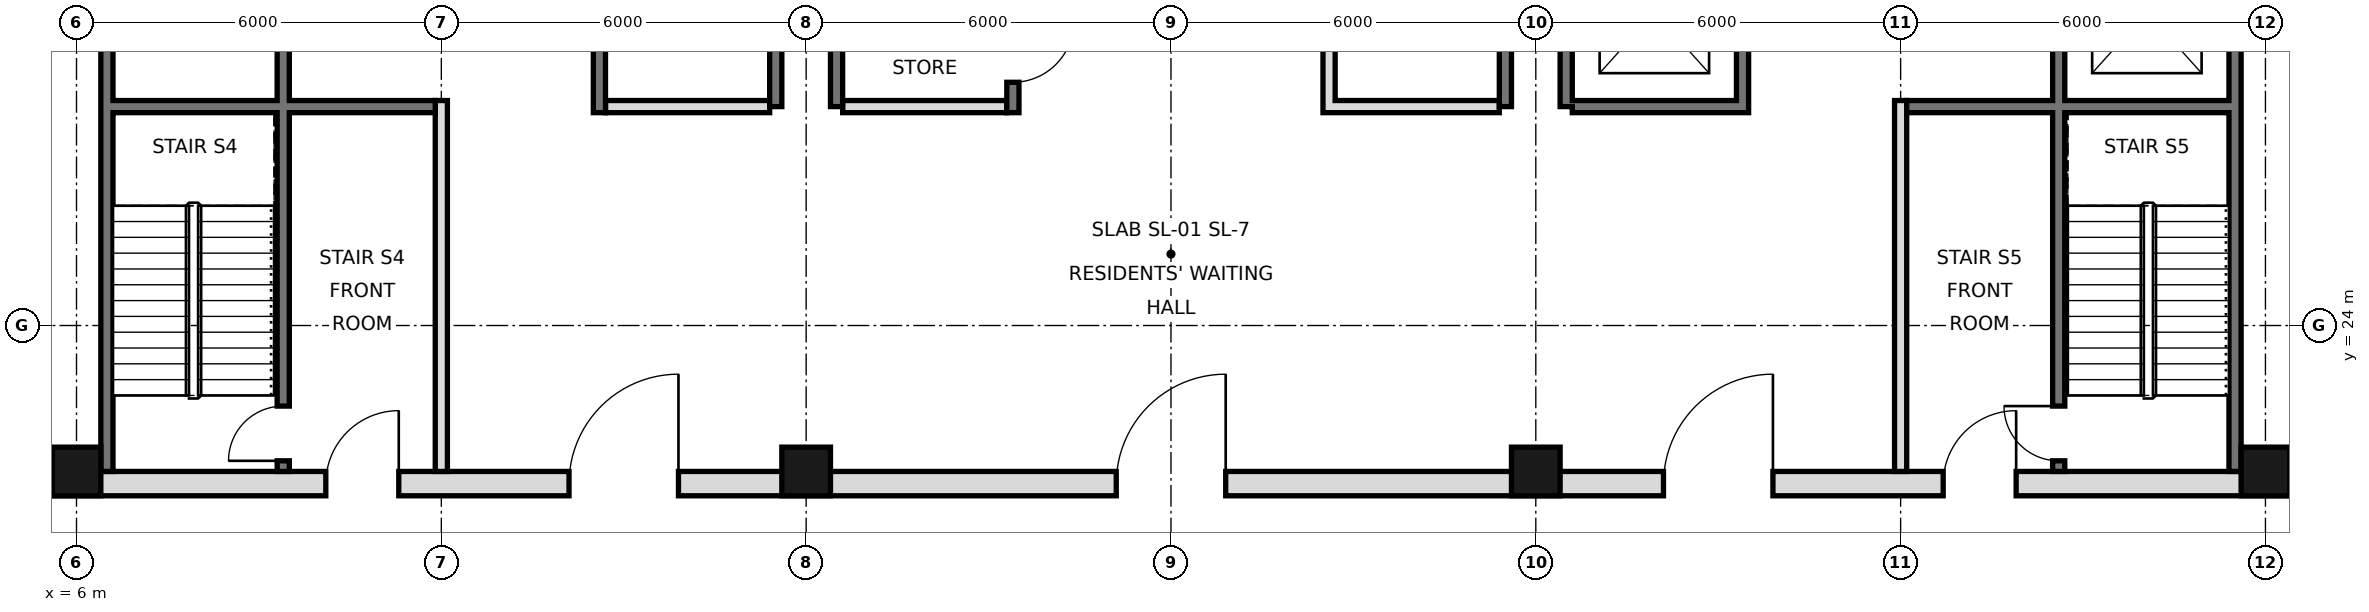
"""IFC4 building model, lengths in metres.
Left out: names, types, materials, properties, quantities, classifications, styles, units other than length and angle.
Written with IfcOpenShell. Run it as: python <this file> out.ifc"""

import sys

from ifc_helpers import new_model, si_unit, direction, frame, frame_2d, origin, origin_2d, place, context, subcontext, project, spatial, rectangle, hollow_rectangle, extrude, element, fill, save


model = new_model("IFC4")
c1 = context("Model", 3, precision=1e-05, world=origin(), true_north=direction((0.0, 1.0)))
c2 = subcontext(c1, "Body", "Model", "MODEL_VIEW")
j1 = project(units=[si_unit("LENGTHUNIT", "METRE"), si_unit("PLANEANGLEUNIT", "RADIAN")], contexts=[c1])
p1 = place(None, origin())
s1 = spatial("IfcSite", under=j1, at=p1, CompositionType="ELEMENT")
p2 = place(p1, origin())
s2 = spatial("IfcBuilding", under=s1, at=p2, CompositionType="ELEMENT")
p3 = place(p2, frame((0.0, 0.0, 326.8)))
s3 = spatial("IfcBuildingStorey", under=s2, at=p3, CompositionType="ELEMENT", Elevation=326.8)
for number, where, z_axis, x_axis in (
    (1, (6.0, 21.6, 0.0), (0.0, 0.0, 1.0), (1.0, 0.0, 0.0)),
    (2, (18.0, 21.6, 0.0), (0.0, 0.0, 1.0), (1.0, 0.0, 0.0)),
    (3, (30.0, 21.6, 0.0), (0.0, 0.0, 1.0), (1.0, 0.0, 0.0)),
    (4, (42.0, 21.6, 0.0), (0.0, 0.0, 1.0), (1.0, 0.0, 0.0)),
):
    element("IfcColumn", number, at=place(p3, frame(where, z_axis=z_axis, x_axis=x_axis)), inside=s3, PredefinedType="COLUMN", context=c2, shape_type="SweptSolid", body=[
        extrude(hollow_rectangle(XDim=0.8, YDim=0.8, WallThickness=0.025, at=origin_2d()), origin(), (0.0, 0.0, 1.0), 4.4),
    ])
for number, where, z_axis, x_axis in (
    (5, (6.5, 21.6, 0.0), (0.0, 0.0, 1.0), (0.0, 1.0, 0.0)),
    (6, (41.5, 21.6, 0.0), (0.0, 0.0, 1.0), (0.0, 1.0, 0.0)),
):
    element("IfcWall", number, at=place(p3, frame(where, z_axis=z_axis, x_axis=x_axis)), inside=s3, PredefinedType="SOLIDWALL", context=c2, shape_type="SweptSolid", body=[
        extrude(rectangle(XDim=23.5, YDim=0.2, at=frame_2d((11.75, 0.0))), origin(), (0.0, 0.0, 1.0), 4.1),
    ])
for number, where, z_axis, x_axis in (
    (7, (17.5, 27.6, 0.0), (0.0, 0.0, 1.0), (0.0, 1.0, 0.0)),
    (8, (18.5, 27.6, 0.0), (0.0, 0.0, 1.0), (0.0, 1.0, 0.0)),
    (9, (29.5, 27.6, 0.0), (0.0, 0.0, 1.0), (0.0, 1.0, 0.0)),
    (10, (30.5, 27.6, 0.0), (0.0, 0.0, 1.0), (0.0, 1.0, 0.0)),
):
    element("IfcWall", number, at=place(p3, frame(where, z_axis=z_axis, x_axis=x_axis)), inside=s3, PredefinedType="SOLIDWALL", context=c2, shape_type="SweptSolid", body=[
        extrude(rectangle(XDim=17.5, YDim=0.2, at=frame_2d((8.75, 0.0))), origin(), (0.0, 0.0, 1.0), 4.1),
    ])
p4 = place(p3, frame((5.6, 21.4, 0.0), z_axis=(0.0, 0.0, 1.0), x_axis=(1.0, 0.0, 0.0)))
e11 = element("IfcWall", 11, at=p4, inside=s3, PredefinedType="SOLIDWALL", context=c2, shape_type="SweptSolid", body=[
    extrude(rectangle(XDim=36.8, YDim=0.4, at=frame_2d((18.4, 0.0))), origin(), (0.0, 0.0, 1.0), 4.1),
])
p5 = place(p4, frame((8.5, 0.0, 0.0)))
e12 = element("IfcOpeningElement", 12, at=p5, cuts=e11, PredefinedType="OPENING", context=c2, shape_type="SweptSolid", body=[
    extrude(rectangle(XDim=1.8, YDim=2.1, at=frame_2d((0.9, 1.05))), frame((0.0, 0.21, 0.0), z_axis=(0.0, -1.0, 0.0), x_axis=(1.0, 0.0, 0.0)), (0.0, 0.0, 1.0), 0.42),
])
p6 = place(p4, frame((17.5, 0.0, 0.0)))
e13 = element("IfcOpeningElement", 13, at=p6, cuts=e11, PredefinedType="OPENING", context=c2, shape_type="SweptSolid", body=[
    extrude(rectangle(XDim=1.8, YDim=2.1, at=frame_2d((0.9, 1.05))), frame((0.0, 0.21, 0.0), z_axis=(0.0, -1.0, 0.0), x_axis=(1.0, 0.0, 0.0)), (0.0, 0.0, 1.0), 0.42),
])
p7 = place(p4, frame((26.5, 0.0, 0.0)))
e14 = element("IfcOpeningElement", 14, at=p7, cuts=e11, PredefinedType="OPENING", context=c2, shape_type="SweptSolid", body=[
    extrude(rectangle(XDim=1.8, YDim=2.1, at=frame_2d((0.9, 1.05))), frame((0.0, 0.21, 0.0), z_axis=(0.0, -1.0, 0.0), x_axis=(1.0, 0.0, 0.0)), (0.0, 0.0, 1.0), 0.42),
])
p8 = place(p4, frame((4.5, 0.0, 0.0)))
e15 = element("IfcOpeningElement", 15, at=p8, cuts=e11, PredefinedType="OPENING", context=c2, shape_type="SweptSolid", body=[
    extrude(rectangle(XDim=1.2, YDim=2.1, at=frame_2d((0.6, 1.05))), frame((0.0, 0.21, 0.0), z_axis=(0.0, -1.0, 0.0), x_axis=(1.0, 0.0, 0.0)), (0.0, 0.0, 1.0), 0.42),
])
p9 = place(p4, frame((31.1, 0.0, 0.0)))
e16 = element("IfcOpeningElement", 16, at=p9, cuts=e11, PredefinedType="OPENING", context=c2, shape_type="SweptSolid", body=[
    extrude(rectangle(XDim=1.2, YDim=2.1, at=frame_2d((0.6, 1.05))), frame((0.0, 0.21, 0.0), z_axis=(0.0, -1.0, 0.0), x_axis=(1.0, 0.0, 0.0)), (0.0, 0.0, 1.0), 0.42),
])
p10 = place(p3, frame((12.0, 21.6, 0.0), z_axis=(0.0, 0.0, 1.0), x_axis=(0.0, 1.0, 0.0)))
e17 = element("IfcWall", 17, at=p10, inside=s3, PredefinedType="PARTITIONING", context=c2, shape_type="SweptSolid", body=[
    extrude(rectangle(XDim=6.1, YDim=0.2, at=frame_2d((3.05, 0.0))), origin(), (0.0, 0.0, 1.0), 4.1),
])
p11 = place(p3, frame((14.6, 27.5, 0.0), z_axis=(0.0, 0.0, 1.0), x_axis=(0.0, 1.0, 0.0)))
e18 = element("IfcWall", 18, at=p11, inside=s3, PredefinedType="SOLIDWALL", context=c2, shape_type="SweptSolid", body=[
    extrude(rectangle(XDim=17.5, YDim=0.2, at=frame_2d((8.75, 0.0))), origin(), (0.0, 0.0, 1.0), 4.1),
])
p12 = place(p11, frame((15.4, 0.0, 0.0)))
e19 = element("IfcOpeningElement", 19, at=p12, cuts=e18, PredefinedType="OPENING", context=c2, shape_type="SweptSolid", body=[
    extrude(rectangle(XDim=1.1, YDim=2.1, at=frame_2d((0.55, 1.05))), frame((0.0, 0.11, 0.0), z_axis=(0.0, -1.0, 0.0), x_axis=(1.0, 0.0, 0.0)), (0.0, 0.0, 1.0), 0.22),
])
p13 = place(p11, frame((2.7, 0.0, 0.0)))
e20 = element("IfcOpeningElement", 20, at=p13, cuts=e18, PredefinedType="OPENING", context=c2, shape_type="SweptSolid", body=[
    extrude(rectangle(XDim=1.0, YDim=2.1, at=frame_2d((0.5, 1.05))), frame((0.0, 0.11, 0.0), z_axis=(0.0, -1.0, 0.0), x_axis=(1.0, 0.0, 0.0)), (0.0, 0.0, 1.0), 0.22),
])
p14 = place(p11, frame((9.9, 0.0, 0.0)))
e21 = element("IfcOpeningElement", 21, at=p14, cuts=e18, PredefinedType="OPENING", context=c2, shape_type="SweptSolid", body=[
    extrude(rectangle(XDim=0.9, YDim=2.1, at=frame_2d((0.45, 1.05))), frame((0.0, 0.11, 0.0), z_axis=(0.0, -1.0, 0.0), x_axis=(1.0, 0.0, 0.0)), (0.0, 0.0, 1.0), 0.22),
])
p15 = place(p3, frame((21.4, 27.5, 0.0), z_axis=(0.0, 0.0, 1.0), x_axis=(0.0, 1.0, 0.0)))
e22 = element("IfcWall", 22, at=p15, inside=s3, PredefinedType="SOLIDWALL", context=c2, shape_type="SweptSolid", body=[
    extrude(rectangle(XDim=17.5, YDim=0.2, at=frame_2d((8.75, 0.0))), origin(), (0.0, 0.0, 1.0), 4.1),
])
p16 = place(p15, frame((0.5, 0.0, 0.0)))
e23 = element("IfcOpeningElement", 23, at=p16, cuts=e22, PredefinedType="OPENING", context=c2, shape_type="SweptSolid", body=[
    extrude(rectangle(XDim=1.0, YDim=2.1, at=frame_2d((0.5, 1.05))), frame((0.0, 0.11, 0.0), z_axis=(0.0, -1.0, 0.0), x_axis=(1.0, 0.0, 0.0)), (0.0, 0.0, 1.0), 0.22),
])
p17 = place(p15, frame((3.6, 0.0, 0.0)))
e24 = element("IfcOpeningElement", 24, at=p17, cuts=e22, PredefinedType="OPENING", context=c2, shape_type="SweptSolid", body=[
    extrude(rectangle(XDim=1.0, YDim=2.1, at=frame_2d((0.5, 1.05))), frame((0.0, 0.11, 0.0), z_axis=(0.0, -1.0, 0.0), x_axis=(1.0, 0.0, 0.0)), (0.0, 0.0, 1.0), 0.22),
])
p18 = place(p15, frame((16.2, 0.0, 0.0)))
e25 = element("IfcOpeningElement", 25, at=p18, cuts=e22, PredefinedType="OPENING", context=c2, shape_type="SweptSolid", body=[
    extrude(rectangle(XDim=1.0, YDim=2.1, at=frame_2d((0.5, 1.05))), frame((0.0, 0.11, 0.0), z_axis=(0.0, -1.0, 0.0), x_axis=(1.0, 0.0, 0.0)), (0.0, 0.0, 1.0), 0.22),
])
p19 = place(p15, frame((7.4, 0.0, 0.0)))
e26 = element("IfcOpeningElement", 26, at=p19, cuts=e22, PredefinedType="OPENING", context=c2, shape_type="SweptSolid", body=[
    extrude(rectangle(XDim=0.9, YDim=2.1, at=frame_2d((0.45, 1.05))), frame((0.0, 0.11, 0.0), z_axis=(0.0, -1.0, 0.0), x_axis=(1.0, 0.0, 0.0)), (0.0, 0.0, 1.0), 0.22),
])
p20 = place(p3, frame((26.6, 27.5, 0.0), z_axis=(0.0, 0.0, 1.0), x_axis=(0.0, 1.0, 0.0)))
e27 = element("IfcWall", 27, at=p20, inside=s3, PredefinedType="SOLIDWALL", context=c2, shape_type="SweptSolid", body=[
    extrude(rectangle(XDim=17.5, YDim=0.2, at=frame_2d((8.75, 0.0))), origin(), (0.0, 0.0, 1.0), 4.1),
])
p21 = place(p20, frame((4.3, 0.0, 0.0)))
e28 = element("IfcOpeningElement", 28, at=p21, cuts=e27, PredefinedType="OPENING", context=c2, shape_type="SweptSolid", body=[
    extrude(rectangle(XDim=0.9, YDim=2.1, at=frame_2d((0.45, 1.05))), frame((0.0, 0.11, 0.0), z_axis=(0.0, -1.0, 0.0), x_axis=(1.0, 0.0, 0.0)), (0.0, 0.0, 1.0), 0.22),
])
p22 = place(p20, frame((10.35, 0.0, 0.0)))
e29 = element("IfcOpeningElement", 29, at=p22, cuts=e27, PredefinedType="OPENING", context=c2, shape_type="SweptSolid", body=[
    extrude(rectangle(XDim=1.0, YDim=2.1, at=frame_2d((0.5, 1.05))), frame((0.0, 0.11, 0.0), z_axis=(0.0, -1.0, 0.0), x_axis=(1.0, 0.0, 0.0)), (0.0, 0.0, 1.0), 0.22),
])
p23 = place(p20, frame((14.575, 0.0, 0.0)))
e30 = element("IfcOpeningElement", 30, at=p23, cuts=e27, PredefinedType="OPENING", context=c2, shape_type="SweptSolid", body=[
    extrude(rectangle(XDim=1.0, YDim=2.1, at=frame_2d((0.5, 1.05))), frame((0.0, 0.11, 0.0), z_axis=(0.0, -1.0, 0.0), x_axis=(1.0, 0.0, 0.0)), (0.0, 0.0, 1.0), 0.22),
])
p24 = place(p3, frame((33.4, 27.5, 0.0), z_axis=(0.0, 0.0, 1.0), x_axis=(0.0, 1.0, 0.0)))
e31 = element("IfcWall", 31, at=p24, inside=s3, PredefinedType="SOLIDWALL", context=c2, shape_type="SweptSolid", body=[
    extrude(rectangle(XDim=17.5, YDim=0.2, at=frame_2d((8.75, 0.0))), origin(), (0.0, 0.0, 1.0), 4.1),
])
p25 = place(p24, frame((1.1, 0.0, 0.0)))
e32 = element("IfcOpeningElement", 32, at=p25, cuts=e31, PredefinedType="OPENING", context=c2, shape_type="SweptSolid", body=[
    extrude(rectangle(XDim=1.1, YDim=2.1, at=frame_2d((0.55, 1.05))), frame((0.0, 0.11, 0.0), z_axis=(0.0, -1.0, 0.0), x_axis=(1.0, 0.0, 0.0)), (0.0, 0.0, 1.0), 0.22),
])
p26 = place(p24, frame((4.2, 0.0, 0.0)))
e33 = element("IfcOpeningElement", 33, at=p26, cuts=e31, PredefinedType="OPENING", context=c2, shape_type="SweptSolid", body=[
    extrude(rectangle(XDim=1.1, YDim=2.1, at=frame_2d((0.55, 1.05))), frame((0.0, 0.11, 0.0), z_axis=(0.0, -1.0, 0.0), x_axis=(1.0, 0.0, 0.0)), (0.0, 0.0, 1.0), 0.22),
])
p27 = place(p24, frame((15.4, 0.0, 0.0)))
e34 = element("IfcOpeningElement", 34, at=p27, cuts=e31, PredefinedType="OPENING", context=c2, shape_type="SweptSolid", body=[
    extrude(rectangle(XDim=1.1, YDim=2.1, at=frame_2d((0.55, 1.05))), frame((0.0, 0.11, 0.0), z_axis=(0.0, -1.0, 0.0), x_axis=(1.0, 0.0, 0.0)), (0.0, 0.0, 1.0), 0.22),
])
p28 = place(p24, frame((9.9, 0.0, 0.0)))
e35 = element("IfcOpeningElement", 35, at=p28, cuts=e31, PredefinedType="OPENING", context=c2, shape_type="SweptSolid", body=[
    extrude(rectangle(XDim=0.9, YDim=2.1, at=frame_2d((0.45, 1.05))), frame((0.0, 0.11, 0.0), z_axis=(0.0, -1.0, 0.0), x_axis=(1.0, 0.0, 0.0)), (0.0, 0.0, 1.0), 0.22),
])
p29 = place(p3, frame((36.0, 21.6, 0.0), z_axis=(0.0, 0.0, 1.0), x_axis=(0.0, 1.0, 0.0)))
e36 = element("IfcWall", 36, at=p29, inside=s3, PredefinedType="PARTITIONING", context=c2, shape_type="SweptSolid", body=[
    extrude(rectangle(XDim=6.1, YDim=0.2, at=frame_2d((3.05, 0.0))), origin(), (0.0, 0.0, 1.0), 4.1),
])
p30 = place(p3, frame((38.6, 21.6, 0.0), z_axis=(0.0, 0.0, 1.0), x_axis=(0.0, 1.0, 0.0)))
e37 = element("IfcWall", 37, at=p30, inside=s3, PredefinedType="SOLIDWALL", context=c2, shape_type="SweptSolid", body=[
    extrude(rectangle(XDim=23.4, YDim=0.2, at=frame_2d((11.7, 0.0))), origin(), (0.0, 0.0, 1.0), 4.1),
])
p31 = place(p30, frame((7.0, 0.0, 0.0)))
e38 = element("IfcOpeningElement", 38, at=p31, cuts=e37, PredefinedType="OPENING", context=c2, shape_type="SweptSolid", body=[
    extrude(rectangle(XDim=1.1, YDim=2.1, at=frame_2d((0.55, 1.05))), frame((0.0, 0.11, 0.0), z_axis=(0.0, -1.0, 0.0), x_axis=(1.0, 0.0, 0.0)), (0.0, 0.0, 1.0), 0.22),
])
p32 = place(p30, frame((10.1, 0.0, 0.0)))
e39 = element("IfcOpeningElement", 39, at=p32, cuts=e37, PredefinedType="OPENING", context=c2, shape_type="SweptSolid", body=[
    extrude(rectangle(XDim=1.1, YDim=2.1, at=frame_2d((0.55, 1.05))), frame((0.0, 0.11, 0.0), z_axis=(0.0, -1.0, 0.0), x_axis=(1.0, 0.0, 0.0)), (0.0, 0.0, 1.0), 0.22),
])
p33 = place(p30, frame((13.2, 0.0, 0.0)))
e40 = element("IfcOpeningElement", 40, at=p33, cuts=e37, PredefinedType="OPENING", context=c2, shape_type="SweptSolid", body=[
    extrude(rectangle(XDim=1.1, YDim=2.1, at=frame_2d((0.55, 1.05))), frame((0.0, 0.11, 0.0), z_axis=(0.0, -1.0, 0.0), x_axis=(1.0, 0.0, 0.0)), (0.0, 0.0, 1.0), 0.22),
])
p34 = place(p30, frame((22.1, 0.0, 0.0)))
e41 = element("IfcOpeningElement", 41, at=p34, cuts=e37, PredefinedType="OPENING", context=c2, shape_type="SweptSolid", body=[
    extrude(rectangle(XDim=1.0, YDim=2.1, at=frame_2d((0.5, 1.05))), frame((0.0, 0.11, 0.0), z_axis=(0.0, -1.0, 0.0), x_axis=(1.0, 0.0, 0.0)), (0.0, 0.0, 1.0), 0.22),
])
p35 = place(p30, frame((0.175, 0.0, 0.0)))
e42 = element("IfcOpeningElement", 42, at=p35, cuts=e37, PredefinedType="OPENING", context=c2, shape_type="SweptSolid", body=[
    extrude(rectangle(XDim=0.9, YDim=2.1, at=frame_2d((0.45, 1.05))), frame((0.0, 0.11, 0.0), z_axis=(0.0, -1.0, 0.0), x_axis=(1.0, 0.0, 0.0)), (0.0, 0.0, 1.0), 0.22),
])
p36 = place(p3, frame((9.4, 21.6, 0.0), z_axis=(0.0, 0.0, 1.0), x_axis=(0.0, 1.0, 0.0)))
e43 = element("IfcWall", 43, at=p36, inside=s3, PredefinedType="SOLIDWALL", context=c2, shape_type="SweptSolid", body=[
    extrude(rectangle(XDim=23.4, YDim=0.2, at=frame_2d((11.7, 0.0))), origin(), (0.0, 0.0, 1.0), 4.1),
])
p37 = place(p36, frame((7.7, 0.0, 0.0)))
e44 = element("IfcOpeningElement", 44, at=p37, cuts=e43, PredefinedType="OPENING", context=c2, shape_type="SweptSolid", body=[
    extrude(rectangle(XDim=1.0, YDim=2.1, at=frame_2d((0.5, 1.05))), frame((0.0, 0.11, 0.0), z_axis=(0.0, -1.0, 0.0), x_axis=(1.0, 0.0, 0.0)), (0.0, 0.0, 1.0), 0.22),
])
p38 = place(p36, frame((12.35, 0.0, 0.0)))
e45 = element("IfcOpeningElement", 45, at=p38, cuts=e43, PredefinedType="OPENING", context=c2, shape_type="SweptSolid", body=[
    extrude(rectangle(XDim=1.0, YDim=2.1, at=frame_2d((0.5, 1.05))), frame((0.0, 0.11, 0.0), z_axis=(0.0, -1.0, 0.0), x_axis=(1.0, 0.0, 0.0)), (0.0, 0.0, 1.0), 0.22),
])
p39 = place(p36, frame((22.1, 0.0, 0.0)))
e46 = element("IfcOpeningElement", 46, at=p39, cuts=e43, PredefinedType="OPENING", context=c2, shape_type="SweptSolid", body=[
    extrude(rectangle(XDim=1.0, YDim=2.1, at=frame_2d((0.5, 1.05))), frame((0.0, 0.11, 0.0), z_axis=(0.0, -1.0, 0.0), x_axis=(1.0, 0.0, 0.0)), (0.0, 0.0, 1.0), 0.22),
])
p40 = place(p36, frame((0.175, 0.0, 0.0)))
e47 = element("IfcOpeningElement", 47, at=p40, cuts=e43, PredefinedType="OPENING", context=c2, shape_type="SweptSolid", body=[
    extrude(rectangle(XDim=0.9, YDim=2.1, at=frame_2d((0.45, 1.05))), frame((0.0, 0.11, 0.0), z_axis=(0.0, -1.0, 0.0), x_axis=(1.0, 0.0, 0.0)), (0.0, 0.0, 1.0), 0.22),
])
for number, where, z_axis, x_axis in (
    (48, (14.7, 27.6, 0.0), (0.0, 0.0, 1.0), (1.0, 0.0, 0.0)),
    (49, (18.6, 27.6, 0.0), (0.0, 0.0, 1.0), (1.0, 0.0, 0.0)),
):
    element("IfcWall", number, at=place(p3, frame(where, z_axis=z_axis, x_axis=x_axis)), inside=s3, PredefinedType="PARTITIONING", context=c2, shape_type="SweptSolid", body=[
        extrude(rectangle(XDim=2.7, YDim=0.2, at=frame_2d((1.35, 0.0))), origin(), (0.0, 0.0, 1.0), 4.1),
    ])
for number, where, z_axis, x_axis in (
    (50, (26.7, 27.6, 0.0), (0.0, 0.0, 1.0), (1.0, 0.0, 0.0)),
    (51, (30.6, 27.6, 0.0), (0.0, 0.0, 1.0), (1.0, 0.0, 0.0)),
):
    element("IfcWall", number, at=place(p3, frame(where, z_axis=z_axis, x_axis=x_axis)), inside=s3, PredefinedType="SOLIDWALL", context=c2, shape_type="SweptSolid", body=[
        extrude(rectangle(XDim=2.7, YDim=0.2, at=frame_2d((1.35, 0.0))), origin(), (0.0, 0.0, 1.0), 4.1),
    ])
for number, where, z_axis, x_axis in (
    (52, (36.1, 27.6, 0.0), (0.0, 0.0, 1.0), (1.0, 0.0, 0.0)),
    (53, (6.6, 27.6, 0.0), (0.0, 0.0, 1.0), (1.0, 0.0, 0.0)),
):
    element("IfcWall", number, at=place(p3, frame(where, z_axis=z_axis, x_axis=x_axis)), inside=s3, PredefinedType="SOLIDWALL", context=c2, shape_type="SweptSolid", body=[
        extrude(rectangle(XDim=5.3, YDim=0.2, at=frame_2d((2.65, 0.0))), origin(), (0.0, 0.0, 1.0), 4.1),
    ])
p41 = place(p5, frame((1.8, 0.0, 0.0), z_axis=(0.0, 0.0, 1.0), x_axis=(-1.0, 0.0, 0.0)))
e54 = element("IfcDoor", 54, at=p41, inside=s3, OperationType="SINGLE_SWING_LEFT", PredefinedType="DOOR", context=c2, shape_type="SweptSolid", body=[
    extrude(rectangle(XDim=1.8, YDim=2.1, at=frame_2d((0.9, 1.05))), frame((0.0, 0.025, 0.0), z_axis=(0.0, -1.0, 0.0), x_axis=(1.0, 0.0, 0.0)), (0.0, 0.0, 1.0), 0.05),
])
fill(e12, e54)
p42 = place(p6, frame((1.8, 0.0, 0.0), z_axis=(0.0, 0.0, 1.0), x_axis=(-1.0, 0.0, 0.0)))
e55 = element("IfcDoor", 55, at=p42, inside=s3, OperationType="SINGLE_SWING_LEFT", PredefinedType="DOOR", context=c2, shape_type="SweptSolid", body=[
    extrude(rectangle(XDim=1.8, YDim=2.1, at=frame_2d((0.9, 1.05))), frame((0.0, 0.025, 0.0), z_axis=(0.0, -1.0, 0.0), x_axis=(1.0, 0.0, 0.0)), (0.0, 0.0, 1.0), 0.05),
])
fill(e13, e55)
p43 = place(p7, frame((1.8, 0.0, 0.0), z_axis=(0.0, 0.0, 1.0), x_axis=(-1.0, 0.0, 0.0)))
e56 = element("IfcDoor", 56, at=p43, inside=s3, OperationType="SINGLE_SWING_LEFT", PredefinedType="DOOR", context=c2, shape_type="SweptSolid", body=[
    extrude(rectangle(XDim=1.8, YDim=2.1, at=frame_2d((0.9, 1.05))), frame((0.0, 0.025, 0.0), z_axis=(0.0, -1.0, 0.0), x_axis=(1.0, 0.0, 0.0)), (0.0, 0.0, 1.0), 0.05),
])
fill(e14, e56)
p44 = place(p8, frame((1.2, 0.0, 0.0), z_axis=(0.0, 0.0, 1.0), x_axis=(-1.0, 0.0, 0.0)))
e57 = element("IfcDoor", 57, at=p44, inside=s3, OperationType="SINGLE_SWING_LEFT", PredefinedType="DOOR", context=c2, shape_type="SweptSolid", body=[
    extrude(rectangle(XDim=1.2, YDim=2.1, at=frame_2d((0.6, 1.05))), frame((0.0, 0.025, 0.0), z_axis=(0.0, -1.0, 0.0), x_axis=(1.0, 0.0, 0.0)), (0.0, 0.0, 1.0), 0.05),
])
fill(e15, e57)
p45 = place(p9, frame((1.2, 0.0, 0.0), z_axis=(0.0, 0.0, 1.0), x_axis=(-1.0, 0.0, 0.0)))
e58 = element("IfcDoor", 58, at=p45, inside=s3, OperationType="SINGLE_SWING_LEFT", PredefinedType="DOOR", context=c2, shape_type="SweptSolid", body=[
    extrude(rectangle(XDim=1.2, YDim=2.1, at=frame_2d((0.6, 1.05))), frame((0.0, 0.025, 0.0), z_axis=(0.0, -1.0, 0.0), x_axis=(1.0, 0.0, 0.0)), (0.0, 0.0, 1.0), 0.05),
])
fill(e16, e58)
p46 = place(p16, origin())
e59 = element("IfcDoor", 59, at=p46, inside=s3, OperationType="SINGLE_SWING_RIGHT", PredefinedType="DOOR", context=c2, shape_type="SweptSolid", body=[
    extrude(rectangle(XDim=1.0, YDim=2.1, at=frame_2d((0.5, 1.05))), frame((0.0, 0.025, 0.0), z_axis=(0.0, -1.0, 0.0), x_axis=(1.0, 0.0, 0.0)), (0.0, 0.0, 1.0), 0.05),
])
fill(e23, e59)
p47 = place(p40, origin())
e60 = element("IfcDoor", 60, at=p47, inside=s3, OperationType="SINGLE_SWING_LEFT", PredefinedType="DOOR", context=c2, shape_type="SweptSolid", body=[
    extrude(rectangle(XDim=0.9, YDim=2.1, at=frame_2d((0.45, 1.05))), frame((0.0, 0.025, 0.0), z_axis=(0.0, -1.0, 0.0), x_axis=(1.0, 0.0, 0.0)), (0.0, 0.0, 1.0), 0.05),
])
fill(e47, e60)
p48 = place(p35, frame((0.9, 0.0, 0.0), z_axis=(0.0, 0.0, 1.0), x_axis=(-1.0, 0.0, 0.0)))
e61 = element("IfcDoor", 61, at=p48, inside=s3, OperationType="SINGLE_SWING_LEFT", PredefinedType="DOOR", context=c2, shape_type="SweptSolid", body=[
    extrude(rectangle(XDim=0.9, YDim=2.1, at=frame_2d((0.45, 1.05))), frame((0.0, 0.025, 0.0), z_axis=(0.0, -1.0, 0.0), x_axis=(1.0, 0.0, 0.0)), (0.0, 0.0, 1.0), 0.05),
])
fill(e42, e61)
save(model, sys.argv[1])
